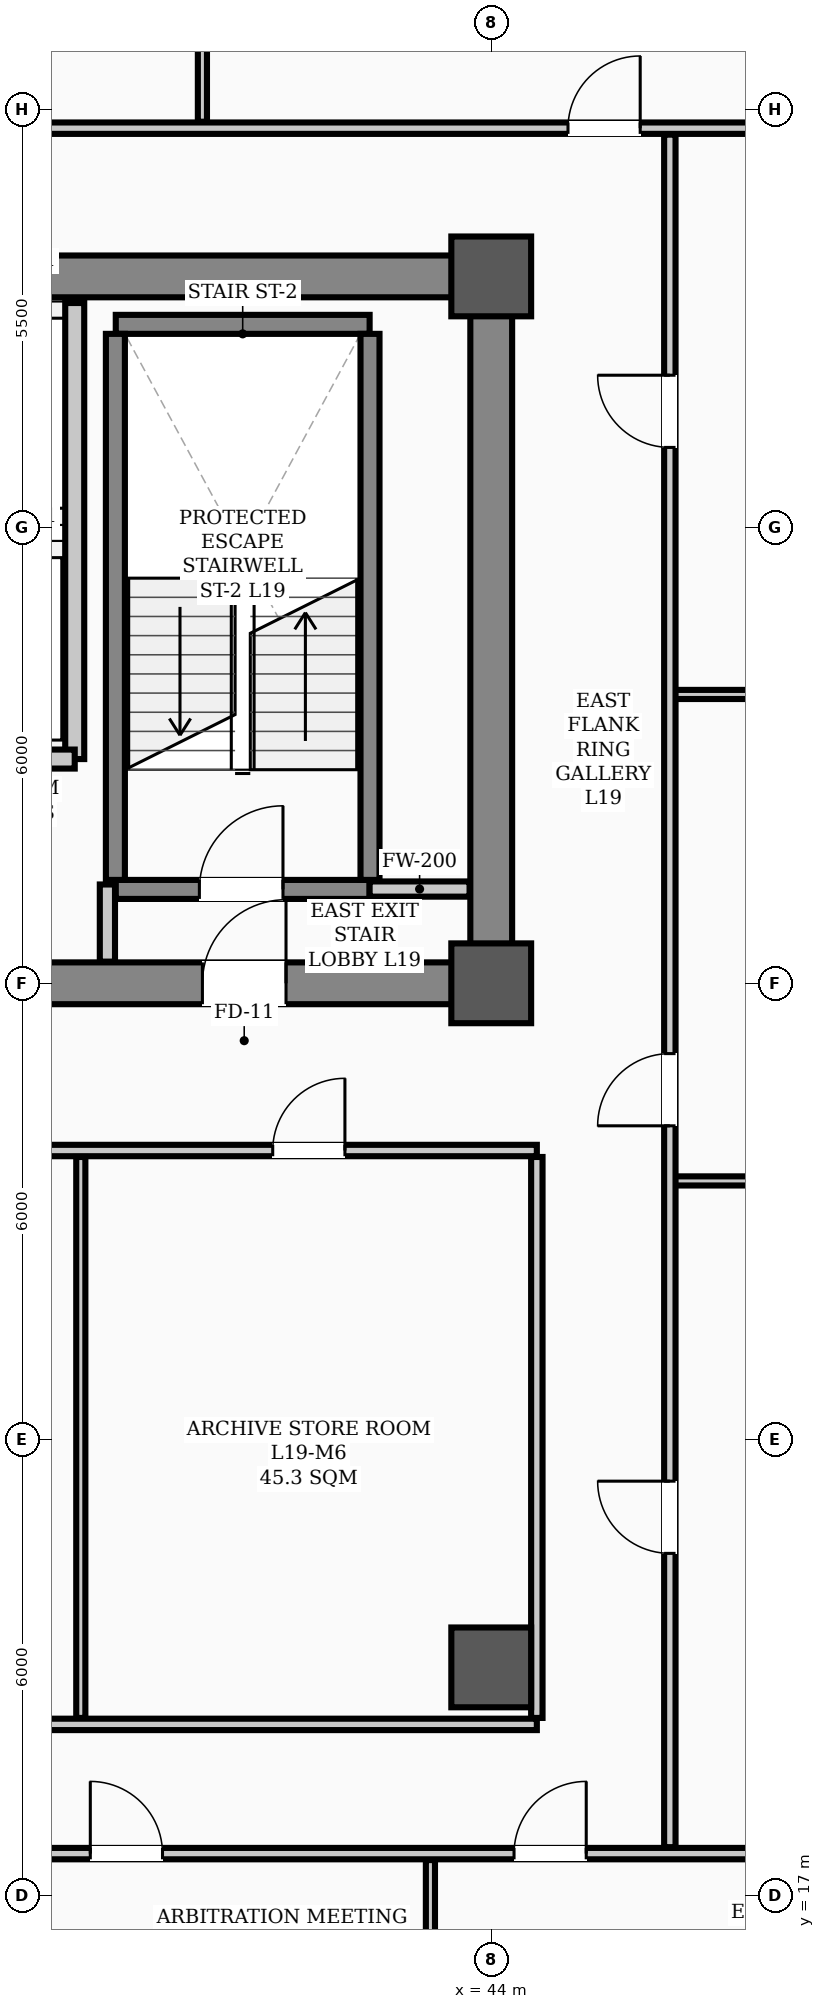
"""IFC4 building model, lengths in metres.
Left out: names, types, materials, properties, quantities, classifications, styles, units other than length and angle.
Written with IfcOpenShell. Run it as: python <this file> out.ifc"""

import sys

from ifc_helpers import new_model, si_unit, direction, frame, frame_2d, origin, origin_2d, place, context, subcontext, project, spatial, rectangle, hollow_rectangle, extrude, element, fill, save


model = new_model("IFC4")
c1 = context("Model", 3, precision=1e-05, world=origin(), true_north=direction((0.0, 1.0)))
c2 = subcontext(c1, "Body", "Model", "MODEL_VIEW")
j1 = project(units=[si_unit("LENGTHUNIT", "METRE"), si_unit("PLANEANGLEUNIT", "RADIAN")], contexts=[c1])
p1 = place(None, origin())
s1 = spatial("IfcSite", under=j1, at=p1, CompositionType="ELEMENT")
p2 = place(p1, origin())
s2 = spatial("IfcBuilding", under=s1, at=p2, CompositionType="ELEMENT")
p3 = place(p2, frame((0.0, 0.0, 77.2)))
s3 = spatial("IfcBuildingStorey", under=s2, at=p3, CompositionType="ELEMENT", Elevation=77.2)
for number, where, z_axis, x_axis in (
    (1, (44.0, 29.0, 0.0), (0.0, 0.0, 1.0), (1.0, 0.0, 0.0)),
    (2, (44.0, 38.3, 0.0), (0.0, 0.0, 1.0), (1.0, 0.0, 0.0)),
    (3, (44.0, 20.0, 0.0), (0.0, 0.0, 1.0), (1.0, 0.0, 0.0)),
):
    element("IfcColumn", number, at=place(p3, frame(where, z_axis=z_axis, x_axis=x_axis)), inside=s3, PredefinedType="COLUMN", context=c2, shape_type="SweptSolid", body=[
        extrude(hollow_rectangle(XDim=1.05, YDim=1.05, WallThickness=0.038, InnerFilletRadius=0.019, OuterFilletRadius=0.057, at=origin_2d()), origin(), (0.0, 0.0, 1.0), 3.9),
    ])
p4 = place(p3, frame((13.5, 29.0, 0.0), z_axis=(0.0, 0.0, 1.0), x_axis=(1.0, 0.0, 0.0)))
e4 = element("IfcWall", 4, at=p4, inside=s3, PredefinedType="SHEAR", context=c2, shape_type="SweptSolid", body=[
    extrude(rectangle(XDim=30.5, YDim=0.55, at=frame_2d((15.25, 0.0))), origin(), (0.0, 0.0, 1.0), 3.66),
])
p5 = place(p4, frame((1.75, 0.0, 0.0)))
e5 = element("IfcOpeningElement", 5, at=p5, cuts=e4, PredefinedType="OPENING", context=c2, shape_type="SweptSolid", body=[
    extrude(rectangle(XDim=1.1, YDim=2.08, at=frame_2d((0.55, 1.04))), frame((0.0, 0.285, 0.0), z_axis=(0.0, -1.0, 0.0), x_axis=(1.0, 0.0, 0.0)), (0.0, 0.0, 1.0), 0.57),
])
p6 = place(p4, frame((26.7, 0.0, 0.0)))
e6 = element("IfcOpeningElement", 6, at=p6, cuts=e4, PredefinedType="OPENING", context=c2, shape_type="SweptSolid", body=[
    extrude(rectangle(XDim=1.1, YDim=2.08, at=frame_2d((0.55, 1.04))), frame((0.0, 0.285, 0.0), z_axis=(0.0, -1.0, 0.0), x_axis=(1.0, 0.0, 0.0)), (0.0, 0.0, 1.0), 0.57),
])
p7 = place(p4, frame((6.8, 0.0, 0.0)))
e7 = element("IfcOpeningElement", 7, at=p7, cuts=e4, PredefinedType="OPENING", context=c2, shape_type="SweptSolid", body=[
    extrude(rectangle(XDim=1.1, YDim=2.08, at=frame_2d((0.55, 1.04))), frame((0.0, 0.285, 0.0), z_axis=(0.0, -1.0, 0.0), x_axis=(1.0, 0.0, 0.0)), (0.0, 0.0, 1.0), 0.57),
])
p8 = place(p4, frame((13.2, 0.0, 0.0)))
e8 = element("IfcOpeningElement", 8, at=p8, cuts=e4, PredefinedType="OPENING", context=c2, shape_type="SweptSolid", body=[
    extrude(rectangle(XDim=1.6, YDim=2.08, at=frame_2d((0.8, 1.04))), frame((0.0, 0.285, 0.0), z_axis=(0.0, -1.0, 0.0), x_axis=(1.0, 0.0, 0.0)), (0.0, 0.0, 1.0), 0.57),
])
p9 = place(p4, frame((19.6, 0.0, 0.0)))
e9 = element("IfcOpeningElement", 9, at=p9, cuts=e4, PredefinedType="OPENING", context=c2, shape_type="SweptSolid", body=[
    extrude(rectangle(XDim=0.9, YDim=2.08, at=frame_2d((0.45, 1.04))), frame((0.0, 0.285, 0.0), z_axis=(0.0, -1.0, 0.0), x_axis=(1.0, 0.0, 0.0)), (0.0, 0.0, 1.0), 0.57),
])
p10 = place(p4, frame((21.6, 0.0, 0.0)))
e10 = element("IfcOpeningElement", 10, at=p10, cuts=e4, PredefinedType="OPENING", context=c2, shape_type="SweptSolid", body=[
    extrude(rectangle(XDim=0.9, YDim=2.08, at=frame_2d((0.45, 1.04))), frame((0.0, 0.285, 0.0), z_axis=(0.0, -1.0, 0.0), x_axis=(1.0, 0.0, 0.0)), (0.0, 0.0, 1.0), 0.57),
])
p11 = place(p3, frame((13.5, 38.3, 0.0), z_axis=(0.0, 0.0, 1.0), x_axis=(1.0, 0.0, 0.0)))
e11 = element("IfcWall", 11, at=p11, inside=s3, PredefinedType="SHEAR", context=c2, shape_type="SweptSolid", body=[
    extrude(rectangle(XDim=30.5, YDim=0.55, at=frame_2d((15.25, 0.0))), origin(), (0.0, 0.0, 1.0), 3.66),
])
p12 = place(p3, frame((44.0, 29.35, 0.0), z_axis=(0.0, 0.0, 1.0), x_axis=(0.0, 1.0, 0.0)))
e12 = element("IfcWall", 12, at=p12, inside=s3, PredefinedType="SHEAR", context=c2, shape_type="SweptSolid", body=[
    extrude(rectangle(XDim=8.6, YDim=0.55, at=frame_2d((4.3, 0.0))), origin(), (0.0, 0.0, 1.0), 3.66),
])
p13 = place(p3, frame((39.06, 30.235, 0.0), z_axis=(0.0, 0.0, 1.0), x_axis=(1.0, 0.0, 0.0)))
e13 = element("IfcWall", 13, at=p13, inside=s3, PredefinedType="STANDARD", context=c2, shape_type="SweptSolid", body=[
    extrude(rectangle(XDim=3.34, YDim=0.25, at=frame_2d((1.67, 0.0))), origin(), (0.0, 0.0, 1.0), 3.66),
])
p14 = place(p13, frame((1.1, 0.0, 0.0)))
e14 = element("IfcOpeningElement", 14, at=p14, cuts=e13, PredefinedType="OPENING", context=c2, shape_type="SweptSolid", body=[
    extrude(rectangle(XDim=1.1, YDim=2.08, at=frame_2d((0.55, 1.04))), frame((0.0, 0.135, 0.0), z_axis=(0.0, -1.0, 0.0), x_axis=(1.0, 0.0, 0.0)), (0.0, 0.0, 1.0), 0.27),
])
p15 = place(p3, frame((39.06, 37.669, 0.0), z_axis=(0.0, 0.0, 1.0), x_axis=(1.0, 0.0, 0.0)))
e15 = element("IfcWall", 15, at=p15, inside=s3, PredefinedType="STANDARD", context=c2, shape_type="SweptSolid", body=[
    extrude(rectangle(XDim=3.34, YDim=0.25, at=frame_2d((1.67, 0.0))), origin(), (0.0, 0.0, 1.0), 3.66),
])
for number, where, z_axis, x_axis in (
    (16, (39.055, 30.36, 0.0), (0.0, 0.0, 1.0), (0.0, 1.0, 0.0)),
    (17, (42.405, 30.36, 0.0), (0.0, 0.0, 1.0), (0.0, 1.0, 0.0)),
):
    element("IfcWall", number, at=place(p3, frame(where, z_axis=z_axis, x_axis=x_axis)), inside=s3, PredefinedType="STANDARD", context=c2, shape_type="SweptSolid", body=[
        extrude(rectangle(XDim=7.184, YDim=0.25, at=frame_2d((3.592, 0.0))), origin(), (0.0, 0.0, 1.0), 3.66),
    ])
p16 = place(p3, frame((38.52, 31.95, 0.0), z_axis=(0.0, 0.0, 1.0), x_axis=(0.0, 1.0, 0.0)))
e18 = element("IfcWall", 18, at=p16, inside=s3, PredefinedType="STANDARD", context=c2, shape_type="SweptSolid", body=[
    extrude(rectangle(XDim=6.0, YDim=0.25, at=frame_2d((3.0, 0.0))), origin(), (0.0, 0.0, 1.0), 2.24),
])
p17 = place(p3, frame((36.62, 31.95, 0.0), z_axis=(0.0, 0.0, 1.0), x_axis=(1.0, 0.0, 0.0)))
e19 = element("IfcWall", 19, at=p17, inside=s3, PredefinedType="STANDARD", context=c2, shape_type="SweptSolid", body=[
    extrude(rectangle(XDim=1.9, YDim=0.25, at=frame_2d((0.95, 0.0))), origin(), (0.0, 0.0, 1.0), 3.48),
])
p18 = place(p3, frame((42.4, 30.24, 0.0), z_axis=(0.0, 0.0, 1.0), x_axis=(1.0, 0.0, 0.0)))
e20 = element("IfcWall", 20, at=p18, inside=s3, PredefinedType="STANDARD", context=c2, shape_type="SweptSolid", body=[
    extrude(rectangle(XDim=1.315, YDim=0.2, at=frame_2d((0.658, 0.0))), origin(), (0.0, 0.0, 1.0), 2.24),
])
p19 = place(p3, frame((12.9, 26.8, 0.0), z_axis=(0.0, 0.0, 1.0), x_axis=(1.0, 0.0, 0.0)))
e21 = element("IfcWall", 21, at=p19, inside=s3, PredefinedType="PARTITIONING", context=c2, shape_type="SweptSolid", body=[
    extrude(rectangle(XDim=31.7, YDim=0.15, at=frame_2d((15.85, 0.0))), origin(), (0.0, 0.0, 1.0), 2.24),
])
p20 = place(p19, frame((13.6, 0.0, 0.0)))
e22 = element("IfcOpeningElement", 22, at=p20, cuts=e21, PredefinedType="OPENING", context=c2, shape_type="SweptSolid", body=[
    extrude(rectangle(XDim=1.6, YDim=2.08, at=frame_2d((0.8, 1.04))), frame((0.0, 0.085, 0.0), z_axis=(0.0, -1.0, 0.0), x_axis=(1.0, 0.0, 0.0)), (0.0, 0.0, 1.0), 0.17),
])
p21 = place(p19, frame((1.875, 0.0, 0.0)))
e23 = element("IfcOpeningElement", 23, at=p21, cuts=e21, PredefinedType="OPENING", context=c2, shape_type="SweptSolid", body=[
    extrude(rectangle(XDim=0.95, YDim=2.08, at=frame_2d((0.475, 1.04))), frame((0.0, 0.085, 0.0), z_axis=(0.0, -1.0, 0.0), x_axis=(1.0, 0.0, 0.0)), (0.0, 0.0, 1.0), 0.17),
])
p22 = place(p19, frame((6.425, 0.0, 0.0)))
e24 = element("IfcOpeningElement", 24, at=p22, cuts=e21, PredefinedType="OPENING", context=c2, shape_type="SweptSolid", body=[
    extrude(rectangle(XDim=0.95, YDim=2.08, at=frame_2d((0.475, 1.04))), frame((0.0, 0.085, 0.0), z_axis=(0.0, -1.0, 0.0), x_axis=(1.0, 0.0, 0.0)), (0.0, 0.0, 1.0), 0.17),
])
p23 = place(p19, frame((10.725, 0.0, 0.0)))
e25 = element("IfcOpeningElement", 25, at=p23, cuts=e21, PredefinedType="OPENING", context=c2, shape_type="SweptSolid", body=[
    extrude(rectangle(XDim=0.95, YDim=2.08, at=frame_2d((0.475, 1.04))), frame((0.0, 0.085, 0.0), z_axis=(0.0, -1.0, 0.0), x_axis=(1.0, 0.0, 0.0)), (0.0, 0.0, 1.0), 0.17),
])
p24 = place(p19, frame((16.075, 0.0, 0.0)))
e26 = element("IfcOpeningElement", 26, at=p24, cuts=e21, PredefinedType="OPENING", context=c2, shape_type="SweptSolid", body=[
    extrude(rectangle(XDim=0.95, YDim=2.08, at=frame_2d((0.475, 1.04))), frame((0.0, 0.085, 0.0), z_axis=(0.0, -1.0, 0.0), x_axis=(1.0, 0.0, 0.0)), (0.0, 0.0, 1.0), 0.17),
])
p25 = place(p19, frame((22.225, 0.0, 0.0)))
e27 = element("IfcOpeningElement", 27, at=p25, cuts=e21, PredefinedType="OPENING", context=c2, shape_type="SweptSolid", body=[
    extrude(rectangle(XDim=0.95, YDim=2.08, at=frame_2d((0.475, 1.04))), frame((0.0, 0.085, 0.0), z_axis=(0.0, -1.0, 0.0), x_axis=(1.0, 0.0, 0.0)), (0.0, 0.0, 1.0), 0.17),
])
p26 = place(p19, frame((28.225, 0.0, 0.0)))
e28 = element("IfcOpeningElement", 28, at=p26, cuts=e21, PredefinedType="OPENING", context=c2, shape_type="SweptSolid", body=[
    extrude(rectangle(XDim=0.95, YDim=2.08, at=frame_2d((0.475, 1.04))), frame((0.0, 0.085, 0.0), z_axis=(0.0, -1.0, 0.0), x_axis=(1.0, 0.0, 0.0)), (0.0, 0.0, 1.0), 0.17),
])
p27 = place(p3, frame((10.16, 17.55, 0.0), z_axis=(0.0, 0.0, 1.0), x_axis=(1.0, 0.0, 0.0)))
e29 = element("IfcWall", 29, at=p27, inside=s3, PredefinedType="PARTITIONING", context=c2, shape_type="SweptSolid", body=[
    extrude(rectangle(XDim=44.68, YDim=0.15, at=frame_2d((22.34, 0.0))), origin(), (0.0, 0.0, 1.0), 2.24),
])
p28 = place(p27, frame((5.465, 0.0, 0.0)))
e30 = element("IfcOpeningElement", 30, at=p28, cuts=e29, PredefinedType="OPENING", context=c2, shape_type="SweptSolid", body=[
    extrude(rectangle(XDim=0.95, YDim=2.08, at=frame_2d((0.475, 1.04))), frame((0.0, 0.085, 0.0), z_axis=(0.0, -1.0, 0.0), x_axis=(1.0, 0.0, 0.0)), (0.0, 0.0, 1.0), 0.17),
])
p29 = place(p27, frame((11.465, 0.0, 0.0)))
e31 = element("IfcOpeningElement", 31, at=p29, cuts=e29, PredefinedType="OPENING", context=c2, shape_type="SweptSolid", body=[
    extrude(rectangle(XDim=0.95, YDim=2.08, at=frame_2d((0.475, 1.04))), frame((0.0, 0.085, 0.0), z_axis=(0.0, -1.0, 0.0), x_axis=(1.0, 0.0, 0.0)), (0.0, 0.0, 1.0), 0.17),
])
p30 = place(p27, frame((28.565, 0.0, 0.0)))
e32 = element("IfcOpeningElement", 32, at=p30, cuts=e29, PredefinedType="OPENING", context=c2, shape_type="SweptSolid", body=[
    extrude(rectangle(XDim=0.95, YDim=2.08, at=frame_2d((0.475, 1.04))), frame((0.0, 0.085, 0.0), z_axis=(0.0, -1.0, 0.0), x_axis=(1.0, 0.0, 0.0)), (0.0, 0.0, 1.0), 0.17),
])
p31 = place(p27, frame((34.14, 0.0, 0.0)))
e33 = element("IfcOpeningElement", 33, at=p31, cuts=e29, PredefinedType="OPENING", context=c2, shape_type="SweptSolid", body=[
    extrude(rectangle(XDim=0.95, YDim=2.08, at=frame_2d((0.475, 1.04))), frame((0.0, 0.085, 0.0), z_axis=(0.0, -1.0, 0.0), x_axis=(1.0, 0.0, 0.0)), (0.0, 0.0, 1.0), 0.17),
])
p32 = place(p3, frame((28.4, 19.25, 0.0), z_axis=(0.0, 0.0, 1.0), x_axis=(1.0, 0.0, 0.0)))
e34 = element("IfcWall", 34, at=p32, inside=s3, PredefinedType="PARTITIONING", context=c2, shape_type="SweptSolid", body=[
    extrude(rectangle(XDim=16.2, YDim=0.15, at=frame_2d((8.1, 0.0))), origin(), (0.0, 0.0, 1.0), 2.24),
])
for number, where, z_axis, x_axis in (
    (35, (46.35, 26.4, 0.0), (0.0, 0.0, 1.0), (1.0, 0.0, 0.0)),
    (36, (46.35, 32.8, 0.0), (0.0, 0.0, 1.0), (1.0, 0.0, 0.0)),
):
    element("IfcWall", number, at=place(p3, frame(where, z_axis=z_axis, x_axis=x_axis)), inside=s3, PredefinedType="PARTITIONING", context=c2, shape_type="SweptSolid", body=[
        extrude(rectangle(XDim=10.84, YDim=0.12, at=frame_2d((5.42, 0.0))), origin(), (0.0, 0.0, 1.0), 2.24),
    ])
p33 = place(p3, frame((7.81, 40.25, 0.0), z_axis=(0.0, 0.0, 1.0), x_axis=(1.0, 0.0, 0.0)))
e37 = element("IfcWall", 37, at=p33, inside=s3, PredefinedType="PARTITIONING", context=c2, shape_type="SweptSolid", body=[
    extrude(rectangle(XDim=49.38, YDim=0.15, at=frame_2d((24.69, 0.0))), origin(), (0.0, 0.0, 1.0), 2.24),
])
p34 = place(p33, frame((3.73, 0.0, 0.0)))
e38 = element("IfcOpeningElement", 38, at=p34, cuts=e37, PredefinedType="OPENING", context=c2, shape_type="SweptSolid", body=[
    extrude(rectangle(XDim=0.95, YDim=2.08, at=frame_2d((0.475, 1.04))), frame((0.0, 0.085, 0.0), z_axis=(0.0, -1.0, 0.0), x_axis=(1.0, 0.0, 0.0)), (0.0, 0.0, 1.0), 0.17),
])
p35 = place(p33, frame((18.115, 0.0, 0.0)))
e39 = element("IfcOpeningElement", 39, at=p35, cuts=e37, PredefinedType="OPENING", context=c2, shape_type="SweptSolid", body=[
    extrude(rectangle(XDim=0.95, YDim=2.08, at=frame_2d((0.475, 1.04))), frame((0.0, 0.085, 0.0), z_axis=(0.0, -1.0, 0.0), x_axis=(1.0, 0.0, 0.0)), (0.0, 0.0, 1.0), 0.17),
])
p36 = place(p33, frame((27.415, 0.0, 0.0)))
e40 = element("IfcOpeningElement", 40, at=p36, cuts=e37, PredefinedType="OPENING", context=c2, shape_type="SweptSolid", body=[
    extrude(rectangle(XDim=0.95, YDim=2.08, at=frame_2d((0.475, 1.04))), frame((0.0, 0.085, 0.0), z_axis=(0.0, -1.0, 0.0), x_axis=(1.0, 0.0, 0.0)), (0.0, 0.0, 1.0), 0.17),
])
p37 = place(p33, frame((37.2, 0.0, 0.0)))
e41 = element("IfcOpeningElement", 41, at=p37, cuts=e37, PredefinedType="OPENING", context=c2, shape_type="SweptSolid", body=[
    extrude(rectangle(XDim=0.95, YDim=2.08, at=frame_2d((0.475, 1.04))), frame((0.0, 0.085, 0.0), z_axis=(0.0, -1.0, 0.0), x_axis=(1.0, 0.0, 0.0)), (0.0, 0.0, 1.0), 0.17),
])
p38 = place(p3, frame((38.95, 29.285, 0.0), z_axis=(0.0, 0.0, 1.0), x_axis=(0.0, 1.0, 0.0)))
e42 = element("IfcWall", 42, at=p38, inside=s3, PredefinedType="STANDARD", context=c2, shape_type="SweptSolid", body=[
    extrude(rectangle(XDim=1.015, YDim=0.2, at=frame_2d((0.508, 0.0))), origin(), (0.0, 0.0, 1.0), 2.24),
])
p39 = place(p3, frame((46.35, 17.635, 0.0), z_axis=(0.0, 0.0, 1.0), x_axis=(0.0, 1.0, 0.0)))
e43 = element("IfcWall", 43, at=p39, inside=s3, PredefinedType="PARTITIONING", context=c2, shape_type="SweptSolid", body=[
    extrude(rectangle(XDim=22.53, YDim=0.15, at=frame_2d((11.265, 0.0))), origin(), (0.0, 0.0, 1.0), 2.24),
])
p40 = place(p39, frame((3.865, 0.0, 0.0)))
e44 = element("IfcOpeningElement", 44, at=p40, cuts=e43, PredefinedType="OPENING", context=c2, shape_type="SweptSolid", body=[
    extrude(rectangle(XDim=0.95, YDim=2.08, at=frame_2d((0.475, 1.04))), frame((0.0, 0.085, 0.0), z_axis=(0.0, -1.0, 0.0), x_axis=(1.0, 0.0, 0.0)), (0.0, 0.0, 1.0), 0.17),
])
p41 = place(p39, frame((9.49, 0.0, 0.0)))
e45 = element("IfcOpeningElement", 45, at=p41, cuts=e43, PredefinedType="OPENING", context=c2, shape_type="SweptSolid", body=[
    extrude(rectangle(XDim=0.95, YDim=2.08, at=frame_2d((0.475, 1.04))), frame((0.0, 0.085, 0.0), z_axis=(0.0, -1.0, 0.0), x_axis=(1.0, 0.0, 0.0)), (0.0, 0.0, 1.0), 0.17),
])
p42 = place(p39, frame((18.415, 0.0, 0.0)))
e46 = element("IfcOpeningElement", 46, at=p42, cuts=e43, PredefinedType="OPENING", context=c2, shape_type="SweptSolid", body=[
    extrude(rectangle(XDim=0.95, YDim=2.08, at=frame_2d((0.475, 1.04))), frame((0.0, 0.085, 0.0), z_axis=(0.0, -1.0, 0.0), x_axis=(1.0, 0.0, 0.0)), (0.0, 0.0, 1.0), 0.17),
])
p43 = place(p3, frame((44.6, 19.335, 0.0), z_axis=(0.0, 0.0, 1.0), x_axis=(0.0, 1.0, 0.0)))
e47 = element("IfcWall", 47, at=p43, inside=s3, PredefinedType="PARTITIONING", context=c2, shape_type="SweptSolid", body=[
    extrude(rectangle(XDim=7.38, YDim=0.15, at=frame_2d((3.69, 0.0))), origin(), (0.0, 0.0, 1.0), 2.24),
])
p44 = place(p3, frame((43.2, 15.31, 0.0), z_axis=(0.0, 0.0, 1.0), x_axis=(0.0, 1.0, 0.0)))
e48 = element("IfcWall", 48, at=p44, inside=s3, PredefinedType="PARTITIONING", context=c2, shape_type="SweptSolid", body=[
    extrude(rectangle(XDim=2.155, YDim=0.12, at=frame_2d((1.078, 0.0))), origin(), (0.0, 0.0, 1.0), 3.24),
])
p45 = place(p3, frame((38.6, 19.335, 0.0), z_axis=(0.0, 0.0, 1.0), x_axis=(0.0, 1.0, 0.0)))
e49 = element("IfcWall", 49, at=p45, inside=s3, PredefinedType="PARTITIONING", context=c2, shape_type="SweptSolid", body=[
    extrude(rectangle(XDim=7.38, YDim=0.12, at=frame_2d((3.69, 0.0))), origin(), (0.0, 0.0, 1.0), 2.24),
])
p46 = place(p3, frame((40.2, 40.335, 0.0), z_axis=(0.0, 0.0, 1.0), x_axis=(0.0, 1.0, 0.0)))
e50 = element("IfcWall", 50, at=p46, inside=s3, PredefinedType="PARTITIONING", context=c2, shape_type="SweptSolid", body=[
    extrude(rectangle(XDim=6.355, YDim=0.12, at=frame_2d((3.177, 0.0))), origin(), (0.0, 0.0, 1.0), 2.24),
])
p47 = place(p14, origin())
e51 = element("IfcDoor", 51, at=p47, inside=s3, OperationType="SINGLE_SWING_RIGHT", PredefinedType="DOOR", context=c2, shape_type="SweptSolid", body=[
    extrude(rectangle(XDim=1.1, YDim=2.08, at=frame_2d((0.55, 1.04))), frame((0.0, 0.025, 0.0), z_axis=(0.0, -1.0, 0.0), x_axis=(1.0, 0.0, 0.0)), (0.0, 0.0, 1.0), 0.05),
])
fill(e14, e51)
p48 = place(p6, origin())
e52 = element("IfcDoor", 52, at=p48, inside=s3, OperationType="SINGLE_SWING_RIGHT", PredefinedType="DOOR", context=c2, shape_type="SweptSolid", body=[
    extrude(rectangle(XDim=1.1, YDim=2.08, at=frame_2d((0.55, 1.04))), frame((0.0, 0.025, 0.0), z_axis=(0.0, -1.0, 0.0), x_axis=(1.0, 0.0, 0.0)), (0.0, 0.0, 1.0), 0.05),
])
fill(e6, e52)
p49 = place(p30, origin())
e53 = element("IfcDoor", 53, at=p49, inside=s3, OperationType="SINGLE_SWING_LEFT", PredefinedType="DOOR", context=c2, shape_type="SweptSolid", body=[
    extrude(rectangle(XDim=0.95, YDim=2.08, at=frame_2d((0.475, 1.04))), frame((0.0, 0.025, 0.0), z_axis=(0.0, -1.0, 0.0), x_axis=(1.0, 0.0, 0.0)), (0.0, 0.0, 1.0), 0.05),
])
fill(e32, e53)
p50 = place(p31, origin())
e54 = element("IfcDoor", 54, at=p50, inside=s3, OperationType="SINGLE_SWING_RIGHT", PredefinedType="DOOR", context=c2, shape_type="SweptSolid", body=[
    extrude(rectangle(XDim=0.95, YDim=2.08, at=frame_2d((0.475, 1.04))), frame((0.0, 0.025, 0.0), z_axis=(0.0, -1.0, 0.0), x_axis=(1.0, 0.0, 0.0)), (0.0, 0.0, 1.0), 0.05),
])
fill(e33, e54)
p51 = place(p26, origin())
e55 = element("IfcDoor", 55, at=p51, inside=s3, OperationType="SINGLE_SWING_RIGHT", PredefinedType="DOOR", context=c2, shape_type="SweptSolid", body=[
    extrude(rectangle(XDim=0.95, YDim=2.08, at=frame_2d((0.475, 1.04))), frame((0.0, 0.025, 0.0), z_axis=(0.0, -1.0, 0.0), x_axis=(1.0, 0.0, 0.0)), (0.0, 0.0, 1.0), 0.05),
])
fill(e28, e55)
p52 = place(p40, origin())
e56 = element("IfcDoor", 56, at=p52, inside=s3, OperationType="SINGLE_SWING_RIGHT", PredefinedType="DOOR", context=c2, shape_type="SweptSolid", body=[
    extrude(rectangle(XDim=0.95, YDim=2.08, at=frame_2d((0.475, 1.04))), frame((0.0, 0.025, 0.0), z_axis=(0.0, -1.0, 0.0), x_axis=(1.0, 0.0, 0.0)), (0.0, 0.0, 1.0), 0.05),
])
fill(e44, e56)
p53 = place(p41, origin())
e57 = element("IfcDoor", 57, at=p53, inside=s3, OperationType="SINGLE_SWING_LEFT", PredefinedType="DOOR", context=c2, shape_type="SweptSolid", body=[
    extrude(rectangle(XDim=0.95, YDim=2.08, at=frame_2d((0.475, 1.04))), frame((0.0, 0.025, 0.0), z_axis=(0.0, -1.0, 0.0), x_axis=(1.0, 0.0, 0.0)), (0.0, 0.0, 1.0), 0.05),
])
fill(e45, e57)
p54 = place(p42, origin())
e58 = element("IfcDoor", 58, at=p54, inside=s3, OperationType="SINGLE_SWING_RIGHT", PredefinedType="DOOR", context=c2, shape_type="SweptSolid", body=[
    extrude(rectangle(XDim=0.95, YDim=2.08, at=frame_2d((0.475, 1.04))), frame((0.0, 0.025, 0.0), z_axis=(0.0, -1.0, 0.0), x_axis=(1.0, 0.0, 0.0)), (0.0, 0.0, 1.0), 0.05),
])
fill(e46, e58)
p55 = place(p37, origin())
e59 = element("IfcDoor", 59, at=p55, inside=s3, OperationType="SINGLE_SWING_RIGHT", PredefinedType="DOOR", context=c2, shape_type="SweptSolid", body=[
    extrude(rectangle(XDim=0.95, YDim=2.08, at=frame_2d((0.475, 1.04))), frame((0.0, 0.025, 0.0), z_axis=(0.0, -1.0, 0.0), x_axis=(1.0, 0.0, 0.0)), (0.0, 0.0, 1.0), 0.05),
])
fill(e41, e59)
save(model, sys.argv[1])
